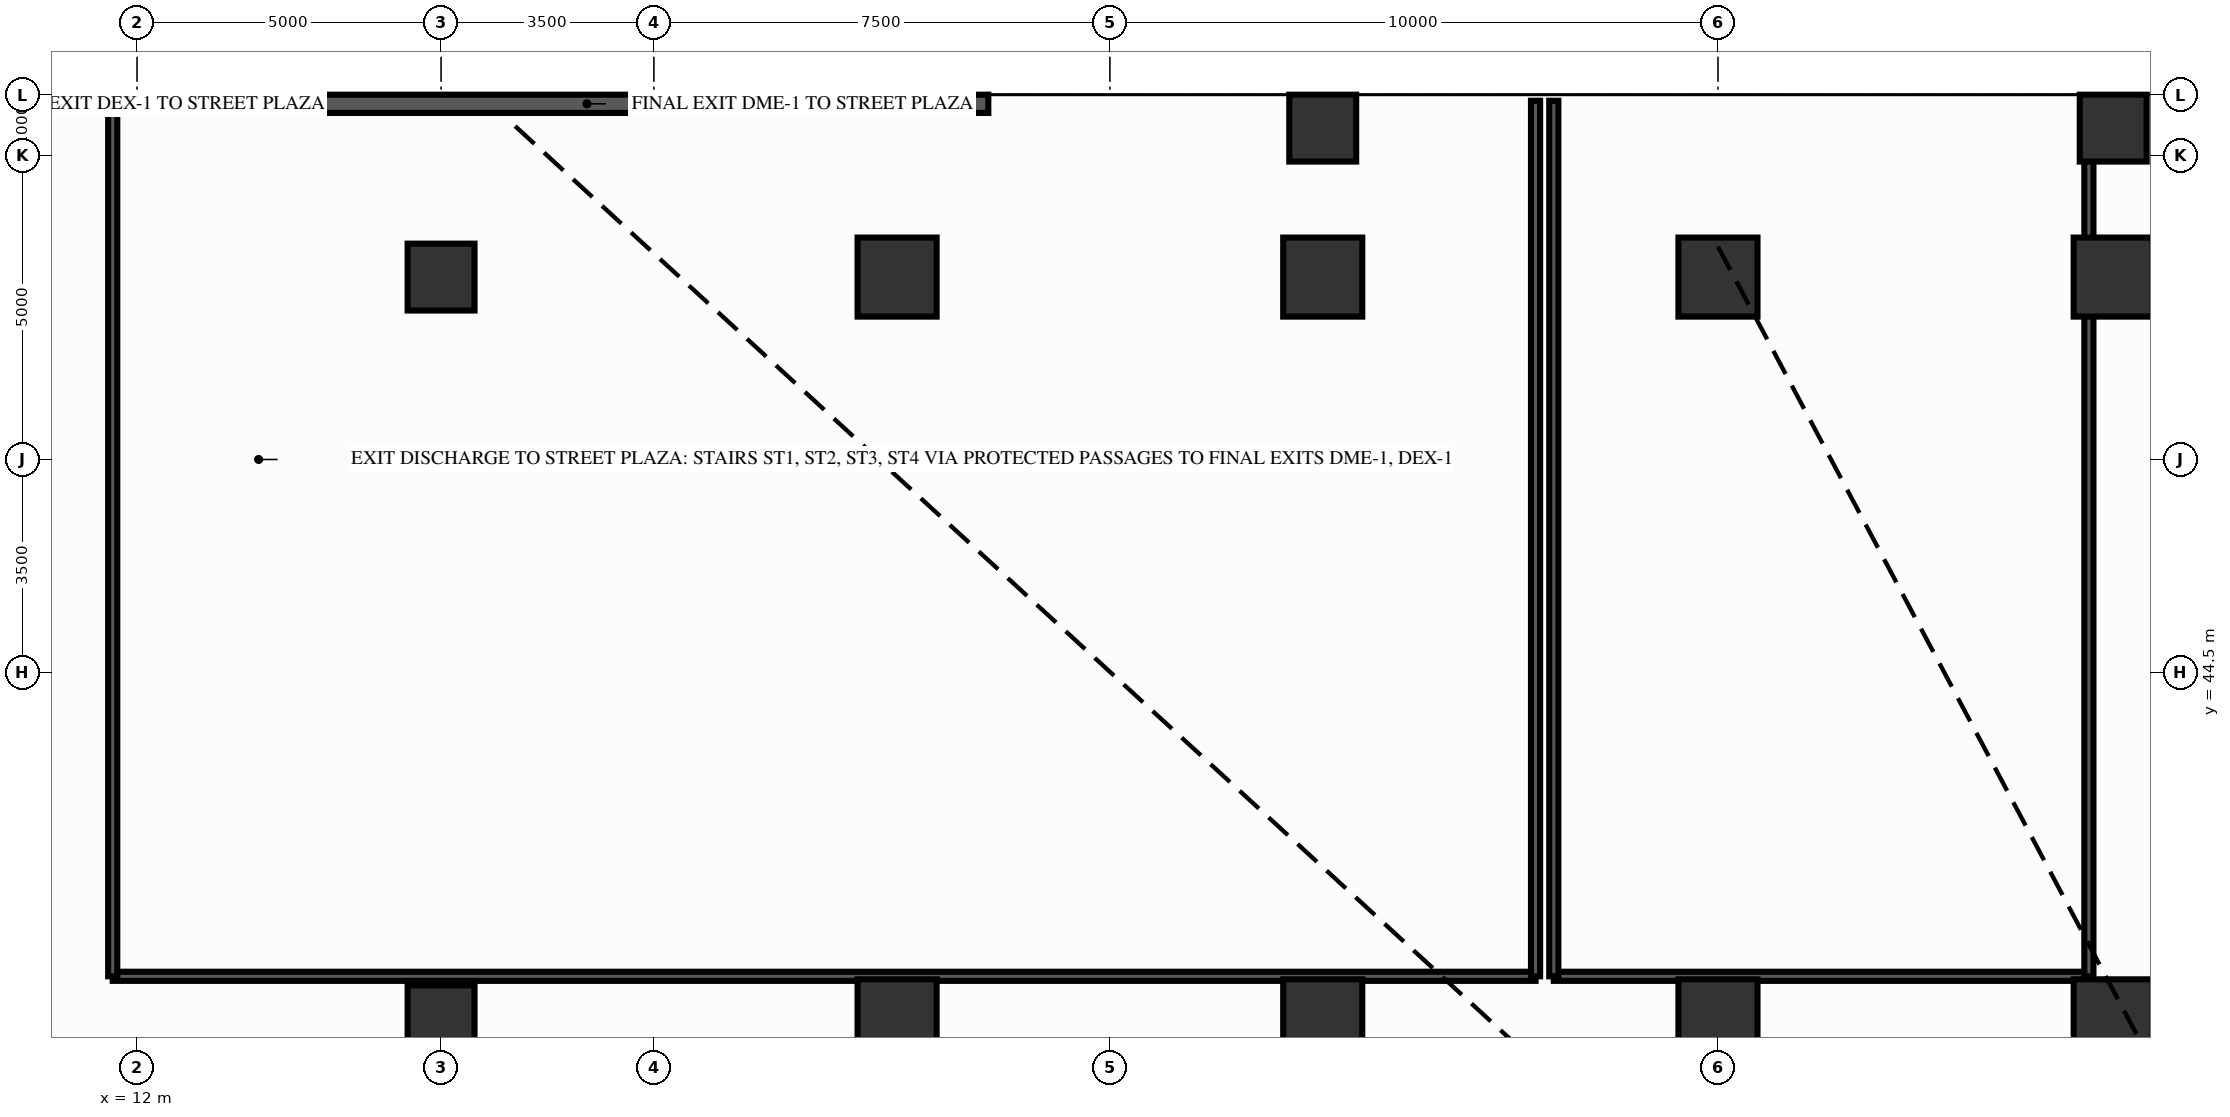
"""IFC4 building model, lengths in metres.
Left out: names, types, materials, properties, quantities, classifications, styles, units other than length and angle.
Written with IfcOpenShell. Run it as: python <this file> out.ifc"""

import sys

from ifc_helpers import new_model, si_unit, direction, frame, frame_2d, origin, origin_2d, place, context, subcontext, project, spatial, rectangle, extrude, source, transform, mapped, element, fill, save


model = new_model("IFC4")
c1 = context("Model", 3, precision=1e-05, world=origin(), true_north=direction((0.0, 1.0)))
c2 = subcontext(c1, "Body", "Model", "MODEL_VIEW")
j1 = project(units=[si_unit("LENGTHUNIT", "METRE"), si_unit("PLANEANGLEUNIT", "RADIAN")], contexts=[c1])
p1 = place(None, origin())
s1 = spatial("IfcSite", under=j1, at=p1, CompositionType="ELEMENT")
p2 = place(p1, origin())
s2 = spatial("IfcBuilding", under=s1, at=p2, CompositionType="ELEMENT")
p3 = place(p2, origin())
s3 = spatial("IfcBuildingStorey", under=s2, at=p3, CompositionType="ELEMENT", Elevation=0.0)
m1 = source(origin(), c2, "Body", "SweptSolid", [
    extrude(rectangle(XDim=1.1, YDim=1.1, at=origin_2d()), origin(), (0.0, 0.0, 1.0), 4.2),
])
for number, where, z_axis, x_axis in (
    (1, (17.0, 38.8, 0.0), (0.0, 0.0, 1.0), (1.0, 0.0, 0.0)),
    (2, (17.0, 51.0, 0.0), (0.0, 0.0, 1.0), (1.0, 0.0, 0.0)),
):
    element("IfcColumn", number, at=place(p3, frame(where, z_axis=z_axis, x_axis=x_axis)), inside=s3, PredefinedType="COLUMN", context=c2, shape_type="MappedRepresentation", body=[
        mapped(m1, transform((0.0, 0.0, 0.0), scale=1.0)),
    ])
m2 = source(origin(), c2, "Body", "SweptSolid", [
    extrude(rectangle(XDim=1.3, YDim=1.3, at=origin_2d()), origin(), (0.0, 0.0, 1.0), 4.2),
])
for number, where, z_axis, x_axis in (
    (3, (24.5, 38.8, 0.0), (0.0, 0.0, 1.0), (1.0, 0.0, 0.0)),
    (4, (24.5, 51.0, 0.0), (0.0, 0.0, 1.0), (1.0, 0.0, 0.0)),
    (5, (31.5, 38.8, 0.0), (0.0, 0.0, 1.0), (1.0, 0.0, 0.0)),
    (6, (31.5, 51.0, 0.0), (0.0, 0.0, 1.0), (1.0, 0.0, 0.0)),
):
    element("IfcColumn", number, at=place(p3, frame(where, z_axis=z_axis, x_axis=x_axis)), inside=s3, PredefinedType="COLUMN", context=c2, shape_type="MappedRepresentation", body=[
        mapped(m2, transform((0.0, 0.0, 0.0), scale=1.0)),
    ])
p4 = place(p3, frame((31.5, 53.45, 0.0), z_axis=(0.0, 0.0, 1.0), x_axis=(1.0, 0.0, 0.0)))
e7 = element("IfcColumn", 7, at=p4, inside=s3, PredefinedType="COLUMN", context=c2, shape_type="MappedRepresentation", body=[
    mapped(m1, transform((0.0, 0.0, 0.0), scale=1.0)),
])
for number, where, z_axis, x_axis in (
    (8, (38.0, 38.8, 0.0), (0.0, 0.0, 1.0), (1.0, 0.0, 0.0)),
    (9, (38.0, 51.0, 0.0), (0.0, 0.0, 1.0), (1.0, 0.0, 0.0)),
    (10, (44.5, 38.8, 0.0), (0.0, 0.0, 1.0), (1.0, 0.0, 0.0)),
    (11, (44.5, 51.0, 0.0), (0.0, 0.0, 1.0), (1.0, 0.0, 0.0)),
):
    element("IfcColumn", number, at=place(p3, frame(where, z_axis=z_axis, x_axis=x_axis)), inside=s3, PredefinedType="COLUMN", context=c2, shape_type="MappedRepresentation", body=[
        mapped(m2, transform((0.0, 0.0, 0.0), scale=1.0)),
    ])
p5 = place(p3, frame((44.5, 53.45, 0.0), z_axis=(0.0, 0.0, 1.0), x_axis=(1.0, 0.0, 0.0)))
e12 = element("IfcColumn", 12, at=p5, inside=s3, PredefinedType="COLUMN", context=c2, shape_type="MappedRepresentation", body=[
    mapped(m1, transform((0.0, 0.0, 0.0), scale=1.0)),
])
p6 = place(p3, frame((0.0, 53.85, 0.0), z_axis=(0.0, 0.0, 1.0), x_axis=(1.0, 0.0, 0.0)))
e13 = element("IfcWall", 13, at=p6, inside=s3, PredefinedType="SOLIDWALL", context=c2, shape_type="SweptSolid", body=[
    extrude(rectangle(XDim=26.0, YDim=0.3, at=frame_2d((13.0, 0.0))), origin(), (0.0, 0.0, 1.0), 3.48),
])
p7 = place(p6, frame((18.2, 0.0, 0.0)))
e14 = element("IfcOpeningElement", 14, at=p7, cuts=e13, PredefinedType="OPENING", context=c2, shape_type="SweptSolid", body=[
    extrude(rectangle(XDim=2.4, YDim=2.4, at=frame_2d((1.2, 1.2))), frame((0.0, 0.162, 0.0), z_axis=(0.0, -1.0, 0.0), x_axis=(1.0, 0.0, 0.0)), (0.0, 0.0, 1.0), 0.324),
])
p8 = place(p6, frame((8.12, 0.0, 0.0)))
e15 = element("IfcOpeningElement", 15, at=p8, cuts=e13, PredefinedType="OPENING", context=c2, shape_type="SweptSolid", body=[
    extrude(rectangle(XDim=1.4, YDim=2.2, at=frame_2d((0.7, 1.1))), frame((0.0, 0.162, 0.0), z_axis=(0.0, -1.0, 0.0), x_axis=(1.0, 0.0, 0.0)), (0.0, 0.0, 1.0), 0.324),
])
p9 = place(p3, frame((11.6, 39.5, 0.0), z_axis=(0.0, 0.0, 1.0), x_axis=(1.0, 0.0, 0.0)))
e16 = element("IfcWall", 16, at=p9, inside=s3, PredefinedType="PARTITIONING", context=c2, shape_type="SweptSolid", body=[
    extrude(rectangle(XDim=23.4, YDim=0.15, at=frame_2d((11.7, 0.0))), origin(), (0.0, 0.0, 1.0), 3.92),
])
p10 = place(p9, frame((9.844, 0.0, 0.0)))
e17 = element("IfcOpeningElement", 17, at=p10, cuts=e16, PredefinedType="OPENING", context=c2, shape_type="SweptSolid", body=[
    extrude(rectangle(XDim=1.0, YDim=2.15, at=frame_2d((0.5, 1.075))), frame((0.0, 0.087, 0.0), z_axis=(0.0, -1.0, 0.0), x_axis=(1.0, 0.0, 0.0)), (0.0, 0.0, 1.0), 0.174),
])
for number, where, z_axis, x_axis in (
    (18, (11.6, 39.5, 0.0), (0.0, 0.0, 1.0), (0.0, 1.0, 0.0)),
    (19, (35.0, 39.5, 0.0), (0.0, 0.0, 1.0), (0.0, 1.0, 0.0)),
):
    element("IfcWall", number, at=place(p3, frame(where, z_axis=z_axis, x_axis=x_axis)), inside=s3, PredefinedType="PARTITIONING", context=c2, shape_type="SweptSolid", body=[
        extrude(rectangle(XDim=14.4, YDim=0.15, at=frame_2d((7.2, 0.0))), origin(), (0.0, 0.0, 1.0), 3.92),
    ])
p11 = place(p3, frame((35.3, 39.5, 0.0), z_axis=(0.0, 0.0, 1.0), x_axis=(1.0, 0.0, 0.0)))
e20 = element("IfcWall", 20, at=p11, inside=s3, PredefinedType="PARTITIONING", context=c2, shape_type="SweptSolid", body=[
    extrude(rectangle(XDim=8.8, YDim=0.15, at=frame_2d((4.4, 0.0))), origin(), (0.0, 0.0, 1.0), 3.92),
])
p12 = place(p11, frame((4.566, 0.0, 0.0)))
e21 = element("IfcOpeningElement", 21, at=p12, cuts=e20, PredefinedType="OPENING", context=c2, shape_type="SweptSolid", body=[
    extrude(rectangle(XDim=1.0, YDim=2.1, at=frame_2d((0.5, 1.05))), frame((0.0, 0.087, 0.0), z_axis=(0.0, -1.0, 0.0), x_axis=(1.0, 0.0, 0.0)), (0.0, 0.0, 1.0), 0.174),
])
for number, where, z_axis, x_axis in (
    (22, (35.3, 39.5, 0.0), (0.0, 0.0, 1.0), (0.0, 1.0, 0.0)),
    (23, (44.1, 39.5, 0.0), (0.0, 0.0, 1.0), (0.0, 1.0, 0.0)),
):
    element("IfcWall", number, at=place(p3, frame(where, z_axis=z_axis, x_axis=x_axis)), inside=s3, PredefinedType="PARTITIONING", context=c2, shape_type="SweptSolid", body=[
        extrude(rectangle(XDim=14.4, YDim=0.15, at=frame_2d((7.2, 0.0))), origin(), (0.0, 0.0, 1.0), 3.92),
    ])
m3 = source(origin(), c2, "Body", "SweptSolid", [
    extrude(rectangle(XDim=2.4, YDim=2.4, at=frame_2d((1.2, 1.2))), frame((0.0, 0.025, 0.0), z_axis=(0.0, -1.0, 0.0), x_axis=(1.0, 0.0, 0.0)), (0.0, 0.0, 1.0), 0.05),
])
p13 = place(p7, origin())
e24 = element("IfcDoor", 24, at=p13, inside=s3, OperationType="DOUBLE_SWING_LEFT", PredefinedType="DOOR", context=c2, shape_type="MappedRepresentation", body=[
    mapped(m3, transform((0.0, 0.0, 0.0), scale=1.0)),
])
fill(e14, e24)
m4 = source(origin(), c2, "Body", "SweptSolid", [
    extrude(rectangle(XDim=1.0, YDim=2.15, at=frame_2d((0.5, 1.075))), frame((0.0, 0.025, 0.0), z_axis=(0.0, -1.0, 0.0), x_axis=(1.0, 0.0, 0.0)), (0.0, 0.0, 1.0), 0.05),
])
p14 = place(p10, origin())
e25 = element("IfcDoor", 25, at=p14, inside=s3, OperationType="SINGLE_SWING_RIGHT", PredefinedType="DOOR", context=c2, shape_type="MappedRepresentation", body=[
    mapped(m4, transform((0.0, 0.0, 0.0), scale=1.0)),
])
fill(e17, e25)
m5 = source(origin(), c2, "Body", "SweptSolid", [
    extrude(rectangle(XDim=1.0, YDim=2.1, at=frame_2d((0.5, 1.05))), frame((0.0, 0.025, 0.0), z_axis=(0.0, -1.0, 0.0), x_axis=(1.0, 0.0, 0.0)), (0.0, 0.0, 1.0), 0.05),
])
p15 = place(p12, origin())
e26 = element("IfcDoor", 26, at=p15, inside=s3, OperationType="SINGLE_SWING_LEFT", PredefinedType="DOOR", context=c2, shape_type="MappedRepresentation", body=[
    mapped(m5, transform((0.0, 0.0, 0.0), scale=1.0)),
])
fill(e21, e26)
save(model, sys.argv[1])
